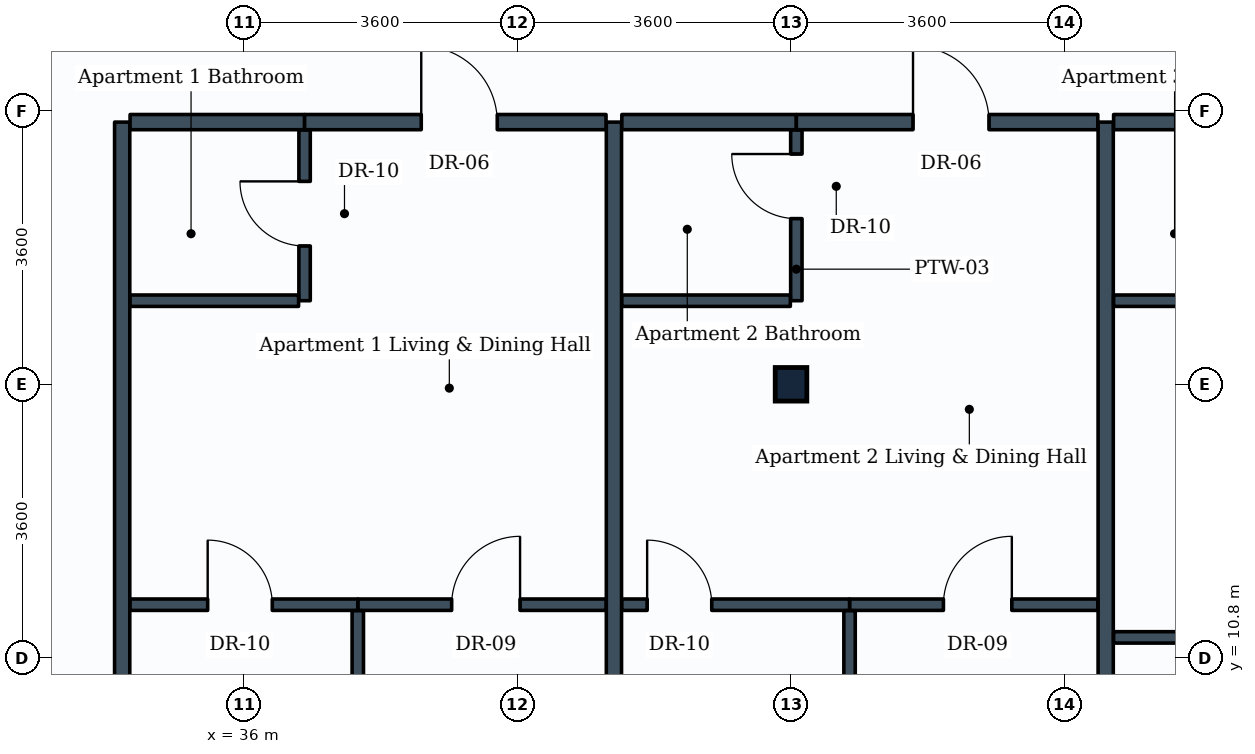
"""IFC4 building model, lengths in metres.
Left out: names, types, materials, properties, quantities, classifications, styles, units other than length and angle.
Written with IfcOpenShell. Run it as: python <this file> out.ifc"""

import sys

from ifc_helpers import new_model, si_unit, direction, frame, frame_2d, origin, origin_2d, place, context, subcontext, project, spatial, rectangle, i_section, extrude, element, fill, save


model = new_model("IFC4")
c1 = context("Model", 3, precision=1e-05, world=origin(), true_north=direction((0.0, 1.0)))
c2 = subcontext(c1, "Body", "Model", "MODEL_VIEW")
j1 = project(units=[si_unit("LENGTHUNIT", "METRE"), si_unit("PLANEANGLEUNIT", "RADIAN")], contexts=[c1])
p1 = place(None, origin())
s1 = spatial("IfcSite", under=j1, at=p1, CompositionType="ELEMENT")
p2 = place(p1, origin())
s2 = spatial("IfcBuilding", under=s1, at=p2, CompositionType="ELEMENT")
p3 = place(p2, frame((0.0, 0.0, 142.8)))
s3 = spatial("IfcBuildingStorey", under=s2, at=p3, CompositionType="ELEMENT", Elevation=142.8)
p4 = place(p3, frame((43.2, 14.4, 0.0), z_axis=(0.0, 0.0, 1.0), x_axis=(1.0, 0.0, 0.0)))
e1 = element("IfcColumn", 1, at=p4, inside=s3, PredefinedType="COLUMN", context=c2, shape_type="SweptSolid", body=[
    extrude(i_section(OverallWidth=0.416, OverallDepth=0.442, WebThickness=0.025, FlangeThickness=0.041, FilletRadius=0.015, at=origin_2d()), origin(), (0.0, 0.0, 1.0), 3.8),
])
for number, where, z_axis, x_axis in (
    (2, (34.4, 3.754, 0.0), (0.0, 0.0, 1.0), (0.0, 1.0, 0.0)),
    (3, (40.87, 3.754, 0.0), (0.0, 0.0, 1.0), (0.0, 1.0, 0.0)),
):
    element("IfcWall", number, at=place(p3, frame(where, z_axis=z_axis, x_axis=x_axis)), inside=s3, PredefinedType="PARTITIONING", context=c2, shape_type="SweptSolid", body=[
        extrude(rectangle(XDim=14.096, YDim=0.2, at=frame_2d((7.048, 0.0))), origin(), (0.0, 0.0, 1.0), 2.93),
    ])
p5 = place(p3, frame((34.504, 17.85, 0.0), z_axis=(0.0, 0.0, 1.0), x_axis=(1.0, 0.0, 0.0)))
e4 = element("IfcWall", 4, at=p5, inside=s3, PredefinedType="PARTITIONING", context=c2, shape_type="SweptSolid", body=[
    extrude(rectangle(XDim=2.296, YDim=0.2, at=frame_2d((1.148, 0.0))), origin(), (0.0, 0.0, 1.0), 3.08),
])
p6 = place(p3, frame((36.8, 15.5, 0.0), z_axis=(0.0, 0.0, 1.0), x_axis=(0.0, 1.0, 0.0)))
e5 = element("IfcWall", 5, at=p6, inside=s3, PredefinedType="PARTITIONING", context=c2, shape_type="SweptSolid", body=[
    extrude(rectangle(XDim=2.246, YDim=0.15, at=frame_2d((1.123, 0.0))), origin(), (0.0, 0.0, 1.0), 3.535),
])
p7 = place(p6, frame((0.72, 0.0, 0.0)))
e6 = element("IfcOpeningElement", 6, at=p7, cuts=e5, PredefinedType="OPENING", context=c2, shape_type="SweptSolid", body=[
    extrude(rectangle(XDim=0.85, YDim=2.1, at=frame_2d((0.425, 1.05))), frame((0.0, 0.085, 0.0), z_axis=(0.0, -1.0, 0.0), x_axis=(1.0, 0.0, 0.0)), (0.0, 0.0, 1.0), 0.17),
])
p8 = place(p3, frame((34.504, 15.5, 0.0), z_axis=(0.0, 0.0, 1.0), x_axis=(1.0, 0.0, 0.0)))
e7 = element("IfcWall", 7, at=p8, inside=s3, PredefinedType="PARTITIONING", context=c2, shape_type="SweptSolid", body=[
    extrude(rectangle(XDim=2.217, YDim=0.15, at=frame_2d((1.108, 0.0))), origin(), (0.0, 0.0, 1.0), 3.22),
])
p9 = place(p3, frame((36.8, 17.85, 0.0), z_axis=(0.0, 0.0, 1.0), x_axis=(1.0, 0.0, 0.0)))
e8 = element("IfcWall", 8, at=p9, inside=s3, PredefinedType="PARTITIONING", context=c2, shape_type="SweptSolid", body=[
    extrude(rectangle(XDim=3.966, YDim=0.2, at=frame_2d((1.983, 0.0))), origin(), (0.0, 0.0, 1.0), 3.08),
])
p10 = place(p9, frame((1.535, 0.0, 0.0)))
e9 = element("IfcOpeningElement", 9, at=p10, cuts=e8, PredefinedType="OPENING", context=c2, shape_type="SweptSolid", body=[
    extrude(rectangle(XDim=1.0, YDim=2.1, at=frame_2d((0.5, 1.05))), frame((0.0, 0.11, 0.0), z_axis=(0.0, -1.0, 0.0), x_axis=(1.0, 0.0, 0.0)), (0.0, 0.0, 1.0), 0.22),
])
p11 = place(p3, frame((37.5, 11.5, 0.0), z_axis=(0.0, 0.0, 1.0), x_axis=(1.0, 0.0, 0.0)))
e10 = element("IfcWall", 10, at=p11, inside=s3, PredefinedType="PARTITIONING", context=c2, shape_type="SweptSolid", body=[
    extrude(rectangle(XDim=3.266, YDim=0.15, at=frame_2d((1.633, 0.0))), origin(), (0.0, 0.0, 1.0), 3.17),
])
p12 = place(p11, frame((1.235, 0.0, 0.0)))
e11 = element("IfcOpeningElement", 11, at=p12, cuts=e10, PredefinedType="OPENING", context=c2, shape_type="SweptSolid", body=[
    extrude(rectangle(XDim=0.9, YDim=2.1, at=frame_2d((0.45, 1.05))), frame((0.0, 0.085, 0.0), z_axis=(0.0, -1.0, 0.0), x_axis=(1.0, 0.0, 0.0)), (0.0, 0.0, 1.0), 0.17),
])
p13 = place(p3, frame((34.504, 11.5, 0.0), z_axis=(0.0, 0.0, 1.0), x_axis=(1.0, 0.0, 0.0)))
e12 = element("IfcWall", 12, at=p13, inside=s3, PredefinedType="PARTITIONING", context=c2, shape_type="SweptSolid", body=[
    extrude(rectangle(XDim=2.996, YDim=0.15, at=frame_2d((1.498, 0.0))), origin(), (0.0, 0.0, 1.0), 3.22),
])
p14 = place(p13, frame((1.021, 0.0, 0.0)))
e13 = element("IfcOpeningElement", 13, at=p14, cuts=e12, PredefinedType="OPENING", context=c2, shape_type="SweptSolid", body=[
    extrude(rectangle(XDim=0.85, YDim=2.1, at=frame_2d((0.425, 1.05))), frame((0.0, 0.085, 0.0), z_axis=(0.0, -1.0, 0.0), x_axis=(1.0, 0.0, 0.0)), (0.0, 0.0, 1.0), 0.17),
])
p15 = place(p3, frame((37.5, 3.754, 0.0), z_axis=(0.0, 0.0, 1.0), x_axis=(0.0, 1.0, 0.0)))
e14 = element("IfcWall", 14, at=p15, inside=s3, PredefinedType="PARTITIONING", context=c2, shape_type="SweptSolid", body=[
    extrude(rectangle(XDim=7.667, YDim=0.15, at=frame_2d((3.833, 0.0))), origin(), (0.0, 0.0, 1.0), 2.93),
])
p16 = place(p3, frame((47.34, 3.754, 0.0), z_axis=(0.0, 0.0, 1.0), x_axis=(0.0, 1.0, 0.0)))
e15 = element("IfcWall", 15, at=p16, inside=s3, PredefinedType="PARTITIONING", context=c2, shape_type="SweptSolid", body=[
    extrude(rectangle(XDim=14.096, YDim=0.2, at=frame_2d((7.048, 0.0))), origin(), (0.0, 0.0, 1.0), 2.93),
])
p17 = place(p3, frame((40.974, 17.85, 0.0), z_axis=(0.0, 0.0, 1.0), x_axis=(1.0, 0.0, 0.0)))
e16 = element("IfcWall", 16, at=p17, inside=s3, PredefinedType="PARTITIONING", context=c2, shape_type="SweptSolid", body=[
    extrude(rectangle(XDim=2.296, YDim=0.2, at=frame_2d((1.148, 0.0))), origin(), (0.0, 0.0, 1.0), 3.13),
])
p18 = place(p3, frame((43.27, 15.5, 0.0), z_axis=(0.0, 0.0, 1.0), x_axis=(0.0, 1.0, 0.0)))
e17 = element("IfcWall", 17, at=p18, inside=s3, PredefinedType="PARTITIONING", context=c2, shape_type="SweptSolid", body=[
    extrude(rectangle(XDim=2.246, YDim=0.15, at=frame_2d((1.123, 0.0))), origin(), (0.0, 0.0, 1.0), 3.18),
])
p19 = place(p18, frame((1.08, 0.0, 0.0)))
e18 = element("IfcOpeningElement", 18, at=p19, cuts=e17, PredefinedType="OPENING", context=c2, shape_type="SweptSolid", body=[
    extrude(rectangle(XDim=0.85, YDim=2.1, at=frame_2d((0.425, 1.05))), frame((0.0, 0.085, 0.0), z_axis=(0.0, -1.0, 0.0), x_axis=(1.0, 0.0, 0.0)), (0.0, 0.0, 1.0), 0.17),
])
p20 = place(p3, frame((40.974, 15.5, 0.0), z_axis=(0.0, 0.0, 1.0), x_axis=(1.0, 0.0, 0.0)))
e19 = element("IfcWall", 19, at=p20, inside=s3, PredefinedType="PARTITIONING", context=c2, shape_type="SweptSolid", body=[
    extrude(rectangle(XDim=2.217, YDim=0.15, at=frame_2d((1.108, 0.0))), origin(), (0.0, 0.0, 1.0), 3.18),
])
p21 = place(p3, frame((43.27, 17.85, 0.0), z_axis=(0.0, 0.0, 1.0), x_axis=(1.0, 0.0, 0.0)))
e20 = element("IfcWall", 20, at=p21, inside=s3, PredefinedType="PARTITIONING", context=c2, shape_type="SweptSolid", body=[
    extrude(rectangle(XDim=3.966, YDim=0.2, at=frame_2d((1.983, 0.0))), origin(), (0.0, 0.0, 1.0), 3.17),
])
p22 = place(p21, frame((1.535, 0.0, 0.0)))
e21 = element("IfcOpeningElement", 21, at=p22, cuts=e20, PredefinedType="OPENING", context=c2, shape_type="SweptSolid", body=[
    extrude(rectangle(XDim=1.0, YDim=2.1, at=frame_2d((0.5, 1.05))), frame((0.0, 0.11, 0.0), z_axis=(0.0, -1.0, 0.0), x_axis=(1.0, 0.0, 0.0)), (0.0, 0.0, 1.0), 0.22),
])
p23 = place(p3, frame((43.97, 11.5, 0.0), z_axis=(0.0, 0.0, 1.0), x_axis=(1.0, 0.0, 0.0)))
e22 = element("IfcWall", 22, at=p23, inside=s3, PredefinedType="PARTITIONING", context=c2, shape_type="SweptSolid", body=[
    extrude(rectangle(XDim=3.266, YDim=0.15, at=frame_2d((1.633, 0.0))), origin(), (0.0, 0.0, 1.0), 3.17),
])
p24 = place(p23, frame((1.235, 0.0, 0.0)))
e23 = element("IfcOpeningElement", 23, at=p24, cuts=e22, PredefinedType="OPENING", context=c2, shape_type="SweptSolid", body=[
    extrude(rectangle(XDim=0.9, YDim=2.1, at=frame_2d((0.45, 1.05))), frame((0.0, 0.085, 0.0), z_axis=(0.0, -1.0, 0.0), x_axis=(1.0, 0.0, 0.0)), (0.0, 0.0, 1.0), 0.17),
])
p25 = place(p3, frame((40.974, 11.5, 0.0), z_axis=(0.0, 0.0, 1.0), x_axis=(1.0, 0.0, 0.0)))
e24 = element("IfcWall", 24, at=p25, inside=s3, PredefinedType="PARTITIONING", context=c2, shape_type="SweptSolid", body=[
    extrude(rectangle(XDim=2.996, YDim=0.15, at=frame_2d((1.498, 0.0))), origin(), (0.0, 0.0, 1.0), 3.18),
])
p26 = place(p25, frame((0.333, 0.0, 0.0)))
e25 = element("IfcOpeningElement", 25, at=p26, cuts=e24, PredefinedType="OPENING", context=c2, shape_type="SweptSolid", body=[
    extrude(rectangle(XDim=0.85, YDim=2.1, at=frame_2d((0.425, 1.05))), frame((0.0, 0.085, 0.0), z_axis=(0.0, -1.0, 0.0), x_axis=(1.0, 0.0, 0.0)), (0.0, 0.0, 1.0), 0.17),
])
p27 = place(p3, frame((43.97, 3.754, 0.0), z_axis=(0.0, 0.0, 1.0), x_axis=(0.0, 1.0, 0.0)))
e26 = element("IfcWall", 26, at=p27, inside=s3, PredefinedType="PARTITIONING", context=c2, shape_type="SweptSolid", body=[
    extrude(rectangle(XDim=7.667, YDim=0.15, at=frame_2d((3.833, 0.0))), origin(), (0.0, 0.0, 1.0), 2.93),
])
p28 = place(p3, frame((47.444, 17.85, 0.0), z_axis=(0.0, 0.0, 1.0), x_axis=(1.0, 0.0, 0.0)))
e27 = element("IfcWall", 27, at=p28, inside=s3, PredefinedType="PARTITIONING", context=c2, shape_type="SweptSolid", body=[
    extrude(rectangle(XDim=2.296, YDim=0.2, at=frame_2d((1.148, 0.0))), origin(), (0.0, 0.0, 1.0), 3.535),
])
p29 = place(p3, frame((47.444, 15.5, 0.0), z_axis=(0.0, 0.0, 1.0), x_axis=(1.0, 0.0, 0.0)))
e28 = element("IfcWall", 28, at=p29, inside=s3, PredefinedType="PARTITIONING", context=c2, shape_type="SweptSolid", body=[
    extrude(rectangle(XDim=2.217, YDim=0.15, at=frame_2d((1.108, 0.0))), origin(), (0.0, 0.0, 1.0), 3.535),
])
p30 = place(p3, frame((47.444, 11.07, 0.0), z_axis=(0.0, 0.0, 1.0), x_axis=(1.0, 0.0, 0.0)))
e29 = element("IfcWall", 29, at=p30, inside=s3, PredefinedType="PARTITIONING", context=c2, shape_type="SweptSolid", body=[
    extrude(rectangle(XDim=2.996, YDim=0.15, at=frame_2d((1.498, 0.0))), origin(), (0.0, 0.0, 1.0), 3.535),
])
p31 = place(p30, frame((1.021, 0.0, 0.0)))
e30 = element("IfcOpeningElement", 30, at=p31, cuts=e29, PredefinedType="OPENING", context=c2, shape_type="SweptSolid", body=[
    extrude(rectangle(XDim=0.85, YDim=2.1, at=frame_2d((0.425, 1.05))), frame((0.0, 0.085, 0.0), z_axis=(0.0, -1.0, 0.0), x_axis=(1.0, 0.0, 0.0)), (0.0, 0.0, 1.0), 0.17),
])
p32 = place(p7, origin())
e31 = element("IfcDoor", 31, at=p32, inside=s3, OperationType="SINGLE_SWING_RIGHT", PredefinedType="DOOR", context=c2, shape_type="SweptSolid", body=[
    extrude(rectangle(XDim=0.85, YDim=2.1, at=frame_2d((0.425, 1.05))), frame((0.0, 0.025, 0.0), z_axis=(0.0, -1.0, 0.0), x_axis=(1.0, 0.0, 0.0)), (0.0, 0.0, 1.0), 0.05),
])
fill(e6, e31)
p33 = place(p10, origin())
e32 = element("IfcDoor", 32, at=p33, inside=s3, OperationType="SINGLE_SWING_LEFT", PredefinedType="DOOR", context=c2, shape_type="SweptSolid", body=[
    extrude(rectangle(XDim=1.0, YDim=2.1, at=frame_2d((0.5, 1.05))), frame((0.0, 0.025, 0.0), z_axis=(0.0, -1.0, 0.0), x_axis=(1.0, 0.0, 0.0)), (0.0, 0.0, 1.0), 0.05),
])
fill(e9, e32)
p34 = place(p12, origin())
e33 = element("IfcDoor", 33, at=p34, inside=s3, OperationType="SINGLE_SWING_RIGHT", PredefinedType="DOOR", context=c2, shape_type="SweptSolid", body=[
    extrude(rectangle(XDim=0.9, YDim=2.1, at=frame_2d((0.45, 1.05))), frame((0.0, 0.025, 0.0), z_axis=(0.0, -1.0, 0.0), x_axis=(1.0, 0.0, 0.0)), (0.0, 0.0, 1.0), 0.05),
])
fill(e11, e33)
p35 = place(p14, origin())
e34 = element("IfcDoor", 34, at=p35, inside=s3, OperationType="SINGLE_SWING_LEFT", PredefinedType="DOOR", context=c2, shape_type="SweptSolid", body=[
    extrude(rectangle(XDim=0.85, YDim=2.1, at=frame_2d((0.425, 1.05))), frame((0.0, 0.025, 0.0), z_axis=(0.0, -1.0, 0.0), x_axis=(1.0, 0.0, 0.0)), (0.0, 0.0, 1.0), 0.05),
])
fill(e13, e34)
p36 = place(p19, origin())
e35 = element("IfcDoor", 35, at=p36, inside=s3, OperationType="SINGLE_SWING_RIGHT", PredefinedType="DOOR", context=c2, shape_type="SweptSolid", body=[
    extrude(rectangle(XDim=0.85, YDim=2.1, at=frame_2d((0.425, 1.05))), frame((0.0, 0.025, 0.0), z_axis=(0.0, -1.0, 0.0), x_axis=(1.0, 0.0, 0.0)), (0.0, 0.0, 1.0), 0.05),
])
fill(e18, e35)
p37 = place(p22, origin())
e36 = element("IfcDoor", 36, at=p37, inside=s3, OperationType="SINGLE_SWING_LEFT", PredefinedType="DOOR", context=c2, shape_type="SweptSolid", body=[
    extrude(rectangle(XDim=1.0, YDim=2.1, at=frame_2d((0.5, 1.05))), frame((0.0, 0.025, 0.0), z_axis=(0.0, -1.0, 0.0), x_axis=(1.0, 0.0, 0.0)), (0.0, 0.0, 1.0), 0.05),
])
fill(e21, e36)
p38 = place(p24, origin())
e37 = element("IfcDoor", 37, at=p38, inside=s3, OperationType="SINGLE_SWING_RIGHT", PredefinedType="DOOR", context=c2, shape_type="SweptSolid", body=[
    extrude(rectangle(XDim=0.9, YDim=2.1, at=frame_2d((0.45, 1.05))), frame((0.0, 0.025, 0.0), z_axis=(0.0, -1.0, 0.0), x_axis=(1.0, 0.0, 0.0)), (0.0, 0.0, 1.0), 0.05),
])
fill(e23, e37)
p39 = place(p26, origin())
e38 = element("IfcDoor", 38, at=p39, inside=s3, OperationType="SINGLE_SWING_LEFT", PredefinedType="DOOR", context=c2, shape_type="SweptSolid", body=[
    extrude(rectangle(XDim=0.85, YDim=2.1, at=frame_2d((0.425, 1.05))), frame((0.0, 0.025, 0.0), z_axis=(0.0, -1.0, 0.0), x_axis=(1.0, 0.0, 0.0)), (0.0, 0.0, 1.0), 0.05),
])
fill(e25, e38)
save(model, sys.argv[1])
